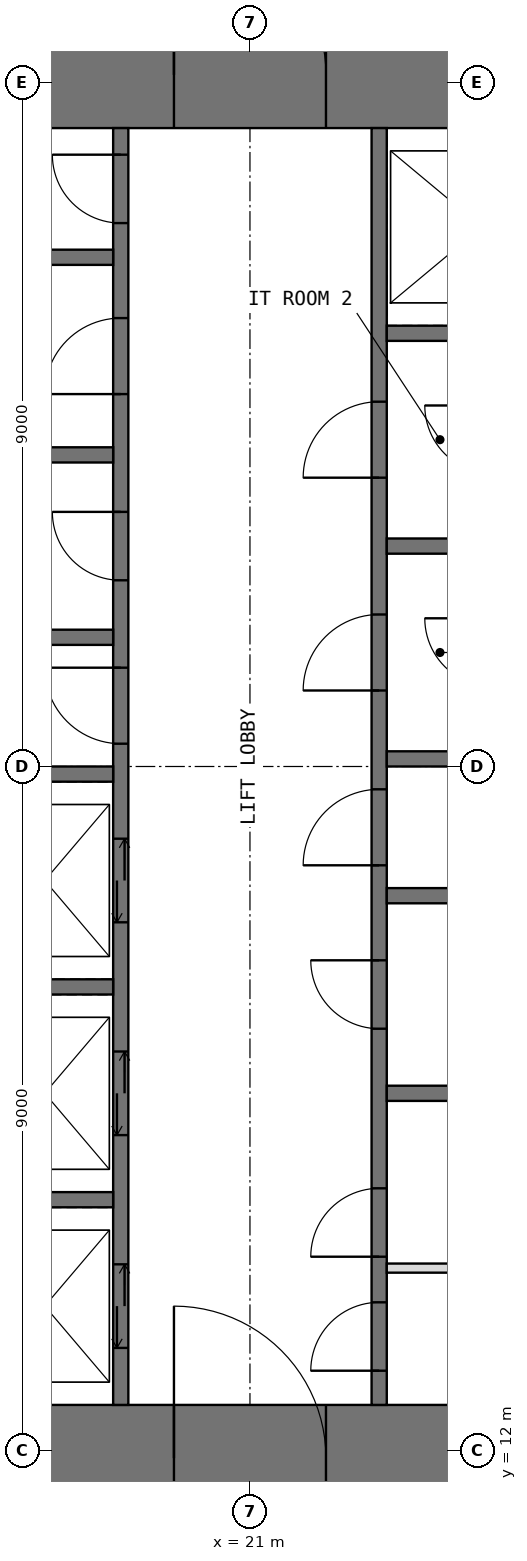
"""IFC4 building model, lengths in metres.
Left out: names, types, materials, properties, quantities, classifications, styles, units other than length and angle.
Written with IfcOpenShell. Run it as: python <this file> out.ifc"""

import sys

from ifc_helpers import new_model, si_unit, direction, frame, frame_2d, origin, place, context, subcontext, project, spatial, rectangle, extrude, element, fill, save


model = new_model("IFC4")
c1 = context("Model", 3, precision=1e-05, world=origin(), true_north=direction((0.0, 1.0)))
c2 = subcontext(c1, "Body", "Model", "MODEL_VIEW")
j1 = project(units=[si_unit("LENGTHUNIT", "METRE"), si_unit("PLANEANGLEUNIT", "RADIAN")], contexts=[c1])
p1 = place(None, origin())
s1 = spatial("IfcSite", under=j1, at=p1, CompositionType="ELEMENT")
p2 = place(p1, origin())
s2 = spatial("IfcBuilding", under=s1, at=p2, CompositionType="ELEMENT")
p3 = place(p2, frame((0.0, 0.0, 222.5)))
s3 = spatial("IfcBuildingStorey", under=s2, at=p3, CompositionType="ELEMENT", Elevation=222.5)
p4 = place(p3, frame((11.2, 11.9, -0.05), z_axis=(0.0, 0.0, 1.0), x_axis=(1.0, 0.0, 0.0)))
e1 = element("IfcWall", 1, at=p4, inside=s3, PredefinedType="SHEAR", context=c2, shape_type="SweptSolid", body=[
    extrude(rectangle(XDim=19.6, YDim=1.4, at=frame_2d((9.8, 0.0))), origin(), (0.0, 0.0, 1.0), 4.0),
])
p5 = place(p4, frame((8.8, 0.0, 0.05)))
e2 = element("IfcOpeningElement", 2, at=p5, cuts=e1, PredefinedType="OPENING", context=c2, shape_type="SweptSolid", body=[
    extrude(rectangle(XDim=2.0, YDim=2.2, at=frame_2d((1.0, 1.1))), frame((0.0, 0.71, 0.0), z_axis=(0.0, -1.0, 0.0), x_axis=(1.0, 0.0, 0.0)), (0.0, 0.0, 1.0), 1.42),
])
p6 = place(p3, frame((11.2, 30.1, -0.05), z_axis=(0.0, 0.0, 1.0), x_axis=(1.0, 0.0, 0.0)))
e3 = element("IfcWall", 3, at=p6, inside=s3, PredefinedType="SHEAR", context=c2, shape_type="SweptSolid", body=[
    extrude(rectangle(XDim=19.6, YDim=1.4, at=frame_2d((9.8, 0.0))), origin(), (0.0, 0.0, 1.0), 4.0),
])
p7 = place(p6, frame((8.8, 0.0, 0.05)))
e4 = element("IfcOpeningElement", 4, at=p7, cuts=e3, PredefinedType="OPENING", context=c2, shape_type="SweptSolid", body=[
    extrude(rectangle(XDim=2.0, YDim=2.2, at=frame_2d((1.0, 1.1))), frame((0.0, 0.71, 0.0), z_axis=(0.0, -1.0, 0.0), x_axis=(1.0, 0.0, 0.0)), (0.0, 0.0, 1.0), 1.42),
])
p8 = place(p3, frame((19.3, 12.6, -0.05), z_axis=(0.0, 0.0, 1.0), x_axis=(0.0, 1.0, 0.0)))
e5 = element("IfcWall", 5, at=p8, inside=s3, PredefinedType="SHEAR", context=c2, shape_type="SweptSolid", body=[
    extrude(rectangle(XDim=16.8, YDim=0.2, at=frame_2d((8.4, 0.0))), origin(), (0.0, 0.0, 1.0), 4.0),
])
p9 = place(p8, frame((8.7, 0.0, 0.05)))
e6 = element("IfcOpeningElement", 6, at=p9, cuts=e5, PredefinedType="OPENING", context=c2, shape_type="SweptSolid", body=[
    extrude(rectangle(XDim=1.0, YDim=2.2, at=frame_2d((0.5, 1.1))), frame((0.0, 0.11, 0.0), z_axis=(0.0, -1.0, 0.0), x_axis=(1.0, 0.0, 0.0)), (0.0, 0.0, 1.0), 0.22),
])
p10 = place(p8, frame((10.85, 0.0, 0.05)))
e7 = element("IfcOpeningElement", 7, at=p10, cuts=e5, PredefinedType="OPENING", context=c2, shape_type="SweptSolid", body=[
    extrude(rectangle(XDim=0.9, YDim=2.2, at=frame_2d((0.45, 1.1))), frame((0.0, 0.11, 0.0), z_axis=(0.0, -1.0, 0.0), x_axis=(1.0, 0.0, 0.0)), (0.0, 0.0, 1.0), 0.22),
])
p11 = place(p8, frame((13.3, 0.0, 0.05)))
e8 = element("IfcOpeningElement", 8, at=p11, cuts=e5, PredefinedType="OPENING", context=c2, shape_type="SweptSolid", body=[
    extrude(rectangle(XDim=1.0, YDim=2.2, at=frame_2d((0.5, 1.1))), frame((0.0, 0.11, 0.0), z_axis=(0.0, -1.0, 0.0), x_axis=(1.0, 0.0, 0.0)), (0.0, 0.0, 1.0), 0.22),
])
p12 = place(p8, frame((15.55, 0.0, 0.05)))
e9 = element("IfcOpeningElement", 9, at=p12, cuts=e5, PredefinedType="OPENING", context=c2, shape_type="SweptSolid", body=[
    extrude(rectangle(XDim=0.9, YDim=2.2, at=frame_2d((0.45, 1.1))), frame((0.0, 0.11, 0.0), z_axis=(0.0, -1.0, 0.0), x_axis=(1.0, 0.0, 0.0)), (0.0, 0.0, 1.0), 0.22),
])
p13 = place(p8, frame((0.75, 0.0, 0.05)))
e10 = element("IfcOpeningElement", 10, at=p13, cuts=e5, PredefinedType="OPENING", context=c2, shape_type="SweptSolid", body=[
    extrude(rectangle(XDim=1.1, YDim=2.2, at=frame_2d((0.55, 1.1))), frame((0.0, 0.11, 0.0), z_axis=(0.0, -1.0, 0.0), x_axis=(1.0, 0.0, 0.0)), (0.0, 0.0, 1.0), 0.22),
])
p14 = place(p8, frame((3.55, 0.0, 0.05)))
e11 = element("IfcOpeningElement", 11, at=p14, cuts=e5, PredefinedType="OPENING", context=c2, shape_type="SweptSolid", body=[
    extrude(rectangle(XDim=1.1, YDim=2.2, at=frame_2d((0.55, 1.1))), frame((0.0, 0.11, 0.0), z_axis=(0.0, -1.0, 0.0), x_axis=(1.0, 0.0, 0.0)), (0.0, 0.0, 1.0), 0.22),
])
p15 = place(p8, frame((6.35, 0.0, 0.05)))
e12 = element("IfcOpeningElement", 12, at=p15, cuts=e5, PredefinedType="OPENING", context=c2, shape_type="SweptSolid", body=[
    extrude(rectangle(XDim=1.1, YDim=2.2, at=frame_2d((0.55, 1.1))), frame((0.0, 0.11, 0.0), z_axis=(0.0, -1.0, 0.0), x_axis=(1.0, 0.0, 0.0)), (0.0, 0.0, 1.0), 0.22),
])
p16 = place(p3, frame((22.7, 12.6, -0.05), z_axis=(0.0, 0.0, 1.0), x_axis=(0.0, 1.0, 0.0)))
e13 = element("IfcWall", 13, at=p16, inside=s3, PredefinedType="SHEAR", context=c2, shape_type="SweptSolid", body=[
    extrude(rectangle(XDim=16.8, YDim=0.2, at=frame_2d((8.4, 0.0))), origin(), (0.0, 0.0, 1.0), 4.0),
])
p17 = place(p16, frame((0.45, 0.0, 0.05)))
e14 = element("IfcOpeningElement", 14, at=p17, cuts=e13, PredefinedType="OPENING", context=c2, shape_type="SweptSolid", body=[
    extrude(rectangle(XDim=0.9, YDim=2.2, at=frame_2d((0.45, 1.1))), frame((0.0, 0.11, 0.0), z_axis=(0.0, -1.0, 0.0), x_axis=(1.0, 0.0, 0.0)), (0.0, 0.0, 1.0), 0.22),
])
p18 = place(p16, frame((7.1, 0.0, 0.05)))
e15 = element("IfcOpeningElement", 15, at=p18, cuts=e13, PredefinedType="OPENING", context=c2, shape_type="SweptSolid", body=[
    extrude(rectangle(XDim=1.0, YDim=2.2, at=frame_2d((0.5, 1.1))), frame((0.0, 0.11, 0.0), z_axis=(0.0, -1.0, 0.0), x_axis=(1.0, 0.0, 0.0)), (0.0, 0.0, 1.0), 0.22),
])
p19 = place(p16, frame((1.95, 0.0, 0.05)))
e16 = element("IfcOpeningElement", 16, at=p19, cuts=e13, PredefinedType="OPENING", context=c2, shape_type="SweptSolid", body=[
    extrude(rectangle(XDim=0.9, YDim=2.2, at=frame_2d((0.45, 1.1))), frame((0.0, 0.11, 0.0), z_axis=(0.0, -1.0, 0.0), x_axis=(1.0, 0.0, 0.0)), (0.0, 0.0, 1.0), 0.22),
])
p20 = place(p16, frame((4.95, 0.0, 0.05)))
e17 = element("IfcOpeningElement", 17, at=p20, cuts=e13, PredefinedType="OPENING", context=c2, shape_type="SweptSolid", body=[
    extrude(rectangle(XDim=0.9, YDim=2.2, at=frame_2d((0.45, 1.1))), frame((0.0, 0.11, 0.0), z_axis=(0.0, -1.0, 0.0), x_axis=(1.0, 0.0, 0.0)), (0.0, 0.0, 1.0), 0.22),
])
p21 = place(p16, frame((9.4, 0.0, 0.05)))
e18 = element("IfcOpeningElement", 18, at=p21, cuts=e13, PredefinedType="OPENING", context=c2, shape_type="SweptSolid", body=[
    extrude(rectangle(XDim=1.0, YDim=2.2, at=frame_2d((0.5, 1.1))), frame((0.0, 0.11, 0.0), z_axis=(0.0, -1.0, 0.0), x_axis=(1.0, 0.0, 0.0)), (0.0, 0.0, 1.0), 0.22),
])
p22 = place(p16, frame((12.2, 0.0, 0.05)))
e19 = element("IfcOpeningElement", 19, at=p22, cuts=e13, PredefinedType="OPENING", context=c2, shape_type="SweptSolid", body=[
    extrude(rectangle(XDim=1.0, YDim=2.2, at=frame_2d((0.5, 1.1))), frame((0.0, 0.11, 0.0), z_axis=(0.0, -1.0, 0.0), x_axis=(1.0, 0.0, 0.0)), (0.0, 0.0, 1.0), 0.22),
])
for number, where, z_axis, x_axis in (
    (20, (16.0, 15.3, -0.05), (0.0, 0.0, 1.0), (1.0, 0.0, 0.0)),
    (21, (16.0, 18.1, -0.05), (0.0, 0.0, 1.0), (1.0, 0.0, 0.0)),
    (22, (16.0, 20.9, -0.05), (0.0, 0.0, 1.0), (1.0, 0.0, 0.0)),
    (23, (16.0, 22.7, -0.05), (0.0, 0.0, 1.0), (1.0, 0.0, 0.0)),
    (24, (16.0, 25.1, -0.05), (0.0, 0.0, 1.0), (1.0, 0.0, 0.0)),
    (25, (16.0, 27.7, -0.05), (0.0, 0.0, 1.0), (1.0, 0.0, 0.0)),
    (26, (22.8, 16.7, -0.05), (0.0, 0.0, 1.0), (1.0, 0.0, 0.0)),
    (27, (22.8, 19.3, -0.05), (0.0, 0.0, 1.0), (1.0, 0.0, 0.0)),
    (28, (22.8, 21.1, -0.05), (0.0, 0.0, 1.0), (1.0, 0.0, 0.0)),
    (29, (22.8, 23.9, -0.05), (0.0, 0.0, 1.0), (1.0, 0.0, 0.0)),
    (30, (22.8, 26.7, -0.05), (0.0, 0.0, 1.0), (1.0, 0.0, 0.0)),
):
    element("IfcWall", number, at=place(p3, frame(where, z_axis=z_axis, x_axis=x_axis)), inside=s3, PredefinedType="SHEAR", context=c2, shape_type="SweptSolid", body=[
        extrude(rectangle(XDim=3.2, YDim=0.2, at=frame_2d((1.6, 0.0))), origin(), (0.0, 0.0, 1.0), 4.0),
    ])
p23 = place(p3, frame((22.8, 14.4, 0.0), z_axis=(0.0, 0.0, 1.0), x_axis=(1.0, 0.0, 0.0)))
e31 = element("IfcWall", 31, at=p23, inside=s3, PredefinedType="PARTITIONING", context=c2, shape_type="SweptSolid", body=[
    extrude(rectangle(XDim=3.2, YDim=0.12, at=frame_2d((1.6, 0.0))), origin(), (0.0, 0.0, 1.0), 3.75),
])
p24 = place(p5, origin())
e32 = element("IfcDoor", 32, at=p24, inside=s3, OperationType="DOUBLE_DOOR_SINGLE_SWING", PredefinedType="DOOR", context=c2, shape_type="SweptSolid", body=[
    extrude(rectangle(XDim=2.0, YDim=2.2, at=frame_2d((1.0, 1.1))), frame((0.0, 0.025, 0.0), z_axis=(0.0, -1.0, 0.0), x_axis=(1.0, 0.0, 0.0)), (0.0, 0.0, 1.0), 0.05),
])
fill(e2, e32)
p25 = place(p7, origin())
e33 = element("IfcDoor", 33, at=p25, inside=s3, OperationType="DOUBLE_DOOR_SINGLE_SWING", PredefinedType="DOOR", context=c2, shape_type="SweptSolid", body=[
    extrude(rectangle(XDim=2.0, YDim=2.2, at=frame_2d((1.0, 1.1))), frame((0.0, 0.025, 0.0), z_axis=(0.0, -1.0, 0.0), x_axis=(1.0, 0.0, 0.0)), (0.0, 0.0, 1.0), 0.05),
])
fill(e4, e33)
p26 = place(p17, origin())
e34 = element("IfcDoor", 34, at=p26, inside=s3, OperationType="SINGLE_SWING_LEFT", PredefinedType="DOOR", context=c2, shape_type="SweptSolid", body=[
    extrude(rectangle(XDim=0.9, YDim=2.2, at=frame_2d((0.45, 1.1))), frame((0.0, 0.025, 0.0), z_axis=(0.0, -1.0, 0.0), x_axis=(1.0, 0.0, 0.0)), (0.0, 0.0, 1.0), 0.05),
])
fill(e14, e34)
p27 = place(p9, origin())
e35 = element("IfcDoor", 35, at=p27, inside=s3, OperationType="SINGLE_SWING_RIGHT", PredefinedType="DOOR", context=c2, shape_type="SweptSolid", body=[
    extrude(rectangle(XDim=1.0, YDim=2.2, at=frame_2d((0.5, 1.1))), frame((0.0, 0.025, 0.0), z_axis=(0.0, -1.0, 0.0), x_axis=(1.0, 0.0, 0.0)), (0.0, 0.0, 1.0), 0.05),
])
fill(e6, e35)
p28 = place(p18, origin())
e36 = element("IfcDoor", 36, at=p28, inside=s3, OperationType="SINGLE_SWING_LEFT", PredefinedType="DOOR", context=c2, shape_type="SweptSolid", body=[
    extrude(rectangle(XDim=1.0, YDim=2.2, at=frame_2d((0.5, 1.1))), frame((0.0, 0.025, 0.0), z_axis=(0.0, -1.0, 0.0), x_axis=(1.0, 0.0, 0.0)), (0.0, 0.0, 1.0), 0.05),
])
fill(e15, e36)
p29 = place(p10, origin())
e37 = element("IfcDoor", 37, at=p29, inside=s3, OperationType="SINGLE_SWING_RIGHT", PredefinedType="DOOR", context=c2, shape_type="SweptSolid", body=[
    extrude(rectangle(XDim=0.9, YDim=2.2, at=frame_2d((0.45, 1.1))), frame((0.0, 0.025, 0.0), z_axis=(0.0, -1.0, 0.0), x_axis=(1.0, 0.0, 0.0)), (0.0, 0.0, 1.0), 0.05),
])
fill(e7, e37)
p30 = place(p11, origin())
e38 = element("IfcDoor", 38, at=p30, inside=s3, OperationType="SINGLE_SWING_LEFT", PredefinedType="DOOR", context=c2, shape_type="SweptSolid", body=[
    extrude(rectangle(XDim=1.0, YDim=2.2, at=frame_2d((0.5, 1.1))), frame((0.0, 0.025, 0.0), z_axis=(0.0, -1.0, 0.0), x_axis=(1.0, 0.0, 0.0)), (0.0, 0.0, 1.0), 0.05),
])
fill(e8, e38)
p31 = place(p12, origin())
e39 = element("IfcDoor", 39, at=p31, inside=s3, OperationType="SINGLE_SWING_RIGHT", PredefinedType="DOOR", context=c2, shape_type="SweptSolid", body=[
    extrude(rectangle(XDim=0.9, YDim=2.2, at=frame_2d((0.45, 1.1))), frame((0.0, 0.025, 0.0), z_axis=(0.0, -1.0, 0.0), x_axis=(1.0, 0.0, 0.0)), (0.0, 0.0, 1.0), 0.05),
])
fill(e9, e39)
p32 = place(p19, origin())
e40 = element("IfcDoor", 40, at=p32, inside=s3, OperationType="SINGLE_SWING_LEFT", PredefinedType="DOOR", context=c2, shape_type="SweptSolid", body=[
    extrude(rectangle(XDim=0.9, YDim=2.2, at=frame_2d((0.45, 1.1))), frame((0.0, 0.025, 0.0), z_axis=(0.0, -1.0, 0.0), x_axis=(1.0, 0.0, 0.0)), (0.0, 0.0, 1.0), 0.05),
])
fill(e16, e40)
p33 = place(p20, origin())
e41 = element("IfcDoor", 41, at=p33, inside=s3, OperationType="SINGLE_SWING_RIGHT", PredefinedType="DOOR", context=c2, shape_type="SweptSolid", body=[
    extrude(rectangle(XDim=0.9, YDim=2.2, at=frame_2d((0.45, 1.1))), frame((0.0, 0.025, 0.0), z_axis=(0.0, -1.0, 0.0), x_axis=(1.0, 0.0, 0.0)), (0.0, 0.0, 1.0), 0.05),
])
fill(e17, e41)
p34 = place(p21, origin())
e42 = element("IfcDoor", 42, at=p34, inside=s3, OperationType="SINGLE_SWING_LEFT", PredefinedType="DOOR", context=c2, shape_type="SweptSolid", body=[
    extrude(rectangle(XDim=1.0, YDim=2.2, at=frame_2d((0.5, 1.1))), frame((0.0, 0.025, 0.0), z_axis=(0.0, -1.0, 0.0), x_axis=(1.0, 0.0, 0.0)), (0.0, 0.0, 1.0), 0.05),
])
fill(e18, e42)
p35 = place(p22, origin())
e43 = element("IfcDoor", 43, at=p35, inside=s3, OperationType="SINGLE_SWING_LEFT", PredefinedType="DOOR", context=c2, shape_type="SweptSolid", body=[
    extrude(rectangle(XDim=1.0, YDim=2.2, at=frame_2d((0.5, 1.1))), frame((0.0, 0.025, 0.0), z_axis=(0.0, -1.0, 0.0), x_axis=(1.0, 0.0, 0.0)), (0.0, 0.0, 1.0), 0.05),
])
fill(e19, e43)
p36 = place(p13, origin())
e44 = element("IfcDoor", 44, at=p36, inside=s3, OperationType="DOUBLE_DOOR_SLIDING", PredefinedType="DOOR", context=c2, shape_type="SweptSolid", body=[
    extrude(rectangle(XDim=1.1, YDim=2.2, at=frame_2d((0.55, 1.1))), frame((0.0, 0.025, 0.0), z_axis=(0.0, -1.0, 0.0), x_axis=(1.0, 0.0, 0.0)), (0.0, 0.0, 1.0), 0.05),
])
fill(e10, e44)
p37 = place(p14, origin())
e45 = element("IfcDoor", 45, at=p37, inside=s3, OperationType="DOUBLE_DOOR_SLIDING", PredefinedType="DOOR", context=c2, shape_type="SweptSolid", body=[
    extrude(rectangle(XDim=1.1, YDim=2.2, at=frame_2d((0.55, 1.1))), frame((0.0, 0.025, 0.0), z_axis=(0.0, -1.0, 0.0), x_axis=(1.0, 0.0, 0.0)), (0.0, 0.0, 1.0), 0.05),
])
fill(e11, e45)
p38 = place(p15, origin())
e46 = element("IfcDoor", 46, at=p38, inside=s3, OperationType="DOUBLE_DOOR_SLIDING", PredefinedType="DOOR", context=c2, shape_type="SweptSolid", body=[
    extrude(rectangle(XDim=1.1, YDim=2.2, at=frame_2d((0.55, 1.1))), frame((0.0, 0.025, 0.0), z_axis=(0.0, -1.0, 0.0), x_axis=(1.0, 0.0, 0.0)), (0.0, 0.0, 1.0), 0.05),
])
fill(e12, e46)
save(model, sys.argv[1])
